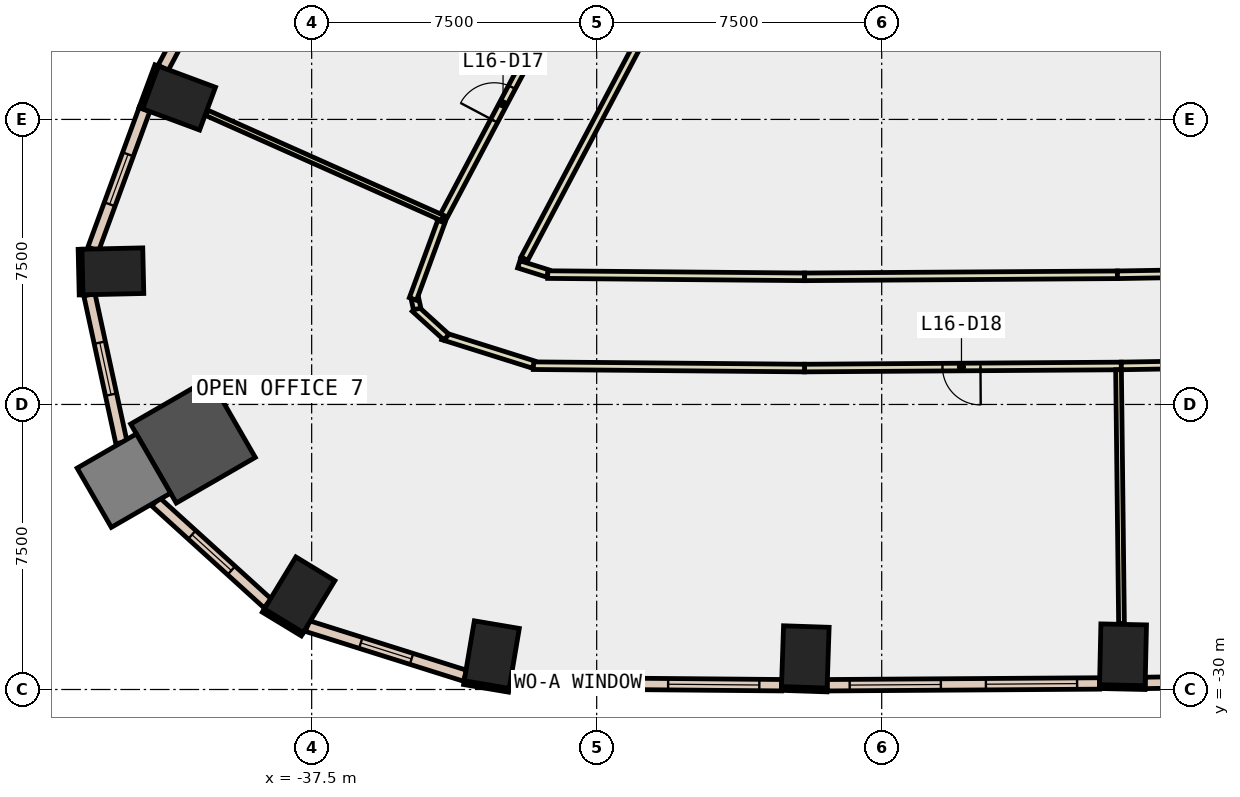
"""IFC4 building model, lengths in metres.
Left out: names, types, materials, properties, quantities, classifications, styles, units other than length and angle.
Written with IfcOpenShell. Run it as: python <this file> out.ifc"""

import sys

from ifc_helpers import new_model, si_unit, direction, frame, frame_2d, origin, origin_2d, place, context, subcontext, project, spatial, rectangle, extrude, element, fill, save


model = new_model("IFC4")
c1 = context("Model", 3, precision=1e-05, world=origin(), true_north=direction((0.0, 1.0)))
c2 = subcontext(c1, "Body", "Model", "MODEL_VIEW")
j1 = project(units=[si_unit("LENGTHUNIT", "METRE"), si_unit("PLANEANGLEUNIT", "RADIAN")], contexts=[c1])
p1 = place(None, origin())
s1 = spatial("IfcSite", under=j1, at=p1, CompositionType="ELEMENT")
p2 = place(p1, origin())
s2 = spatial("IfcBuilding", under=s1, at=p2, CompositionType="ELEMENT")
p3 = place(p2, frame((0.0, 0.0, 77.0)))
s3 = spatial("IfcBuildingStorey", under=s2, at=p3, CompositionType="ELEMENT", Elevation=77.0)
for number, where, z_axis, x_axis in (
    (1, (-32.761, -29.082, -0.4), (0.0, 0.0, 1.0), (-0.986, 0.167, 0.0)),
    (2, (-24.51, -29.143, -0.4), (0.0, 0.0, 1.0), (-0.999, 0.034, 0.0)),
    (3, (-16.15, -29.087, -0.4), (0.0, 0.0, 1.0), (-1.0, 0.022, 0.0)),
    (4, (-40.99, -14.438, -0.4), (0.0, 0.0, 1.0), (0.348, 0.937, 0.0)),
    (5, (-42.731, -18.998, -0.4), (0.0, 0.0, 1.0), (-0.023, 1.0, 0.0)),
):
    element("IfcColumn", number, at=place(p3, frame(where, z_axis=z_axis, x_axis=x_axis)), inside=s3, PredefinedType="COLUMN", context=c2, shape_type="SweptSolid", body=[
        extrude(rectangle(XDim=1.2, YDim=1.6, at=origin_2d()), origin(), (0.0, 0.0, 1.0), 4.0),
    ])
p4 = place(p3, frame((-40.623, -23.454, -0.4), z_axis=(0.0, 0.0, 1.0), x_axis=(0.866025403784, 0.5, 0.0)))
e6 = element("IfcColumn", 6, at=p4, inside=s3, PredefinedType="COLUMN", context=c2, shape_type="SweptSolid", body=[
    extrude(rectangle(XDim=2.4, YDim=2.4, at=origin_2d()), origin(), (0.0, 0.0, 1.0), 4.0),
])
p5 = place(p3, frame((-37.818, -27.508, -0.4), z_axis=(0.0, 0.0, 1.0), x_axis=(-0.854522294989, 0.519414716163, 0.0)))
e7 = element("IfcColumn", 7, at=p5, inside=s3, PredefinedType="COLUMN", context=c2, shape_type="SweptSolid", body=[
    extrude(rectangle(XDim=1.2, YDim=1.6, at=origin_2d()), origin(), (0.0, 0.0, 1.0), 4.0),
])
p6 = place(p3, frame((-42.442, -24.504, -0.4), z_axis=(0.0, 0.0, 1.0), x_axis=(0.866025403784, 0.5, 0.0)))
e8 = element("IfcColumn", 8, at=p6, inside=s3, PredefinedType="COLUMN", context=c2, shape_type="SweptSolid", body=[
    extrude(rectangle(XDim=1.8, YDim=1.8, at=origin_2d()), origin(), (0.0, 0.0, 1.0), 4.0),
])
p7 = place(p3, frame((-41.578, -13.58, 0.0), z_axis=(0.0, 0.0, 1.0), x_axis=(-0.348446984414, -0.937328490473, 0.0)))
e9 = element("IfcWall", 9, at=p7, inside=s3, PredefinedType="STANDARD", context=c2, shape_type="SweptSolid", body=[
    extrude(rectangle(XDim=1.2, YDim=0.1, at=frame_2d((0.6, 0.0))), origin(), (0.0, 0.0, 1.0), 3.6),
])
for number, where, z_axis, x_axis in (
    (10, (-33.494, -29.82, 0.0), (0.0, 0.0, 1.0), (0.986, -0.167, 0.0)),
    (11, (-25.138, -29.972, 0.0), (0.0, 0.0, 1.0), (0.999, -0.033, 0.0)),
):
    element("IfcWall", number, at=place(p3, frame(where, z_axis=z_axis, x_axis=x_axis)), inside=s3, PredefinedType="STANDARD", context=c2, shape_type="SweptSolid", body=[
        extrude(rectangle(XDim=1.2, YDim=0.1, at=frame_2d((0.6, 0.0))), origin(), (0.0, 0.0, 1.0), 3.6),
    ])
for number, where, z_axis, x_axis in (
    (12, (-16.769, -29.924, 0.0), (0.0, 0.0, 1.0), (1.0, -0.022, 0.0)),
    (13, (-43.595, -18.417, 0.0), (0.0, 0.0, 1.0), (0.023, -1.0, 0.0)),
    (14, (-38.772, -27.923, 0.0), (0.0, 0.0, 1.0), (0.855, -0.519, 0.0)),
):
    element("IfcWall", number, at=place(p3, frame(where, z_axis=z_axis, x_axis=x_axis)), inside=s3, PredefinedType="STANDARD", context=c2, shape_type="SweptSolid", body=[
        extrude(rectangle(XDim=1.2, YDim=0.1, at=frame_2d((0.6, 0.0))), origin(), (0.0, 0.0, 1.0), 3.6),
    ])
p8 = place(p3, frame((-32.279, -29.825, 0.0), z_axis=(0.0, 0.0, 1.0), x_axis=(0.999962339493, -0.008678686333, 0.0)))
e15 = element("IfcWall", 15, at=p8, inside=s3, PredefinedType="STANDARD", context=c2, shape_type="SweptSolid", body=[
    extrude(rectangle(XDim=7.145, YDim=0.3, at=frame_2d((3.573, 0.0))), origin(), (0.0, 0.0, 1.0), 3.6),
])
p9 = place(p8, frame((0.586, 0.0, 0.9)))
e16 = element("IfcOpeningElement", 16, at=p9, cuts=e15, PredefinedType="OPENING", context=c2, shape_type="SweptSolid", body=[
    extrude(rectangle(XDim=2.4, YDim=2.6, at=frame_2d((1.2, 1.3))), frame((0.0, 0.16, 0.0), z_axis=(0.0, -1.0, 0.0), x_axis=(1.0, 0.0, 0.0)), (0.0, 0.0, 1.0), 0.32),
])
p10 = place(p8, frame((4.159, 0.0, 0.9)))
e17 = element("IfcOpeningElement", 17, at=p10, cuts=e15, PredefinedType="OPENING", context=c2, shape_type="SweptSolid", body=[
    extrude(rectangle(XDim=2.4, YDim=2.6, at=frame_2d((1.2, 1.3))), frame((0.0, 0.16, 0.0), z_axis=(0.0, -1.0, 0.0), x_axis=(1.0, 0.0, 0.0)), (0.0, 0.0, 1.0), 0.32),
])
p11 = place(p3, frame((-23.935, -29.888, 0.0), z_axis=(0.0, 0.0, 1.0), x_axis=(0.999978623918, 0.006538478947, 0.0)))
e18 = element("IfcWall", 18, at=p11, inside=s3, PredefinedType="STANDARD", context=c2, shape_type="SweptSolid", body=[
    extrude(rectangle(XDim=7.169, YDim=0.3, at=frame_2d((3.584, 0.0))), origin(), (0.0, 0.0, 1.0), 3.6),
])
p12 = place(p11, frame((0.592, 0.0, 0.9)))
e19 = element("IfcOpeningElement", 19, at=p12, cuts=e18, PredefinedType="OPENING", context=c2, shape_type="SweptSolid", body=[
    extrude(rectangle(XDim=2.4, YDim=2.6, at=frame_2d((1.2, 1.3))), frame((0.0, 0.16, 0.0), z_axis=(0.0, -1.0, 0.0), x_axis=(1.0, 0.0, 0.0)), (0.0, 0.0, 1.0), 0.32),
])
p13 = place(p11, frame((4.177, 0.0, 0.9)))
e20 = element("IfcOpeningElement", 20, at=p13, cuts=e18, PredefinedType="OPENING", context=c2, shape_type="SweptSolid", body=[
    extrude(rectangle(XDim=2.4, YDim=2.6, at=frame_2d((1.2, 1.3))), frame((0.0, 0.16, 0.0), z_axis=(0.0, -1.0, 0.0), x_axis=(1.0, 0.0, 0.0)), (0.0, 0.0, 1.0), 0.32),
])
p14 = place(p3, frame((-15.567, -29.827, 0.0), z_axis=(0.0, 0.0, 1.0), x_axis=(0.999857944706, 0.0168549817, 0.0)))
e21 = element("IfcWall", 21, at=p14, inside=s3, PredefinedType="STANDARD", context=c2, shape_type="SweptSolid", body=[
    extrude(rectangle(XDim=7.17, YDim=0.3, at=frame_2d((3.585, 0.0))), origin(), (0.0, 0.0, 1.0), 3.6),
])
p15 = place(p14, frame((0.593, 0.0, 0.9)))
e22 = element("IfcOpeningElement", 22, at=p15, cuts=e21, PredefinedType="OPENING", context=c2, shape_type="SweptSolid", body=[
    extrude(rectangle(XDim=2.4, YDim=2.6, at=frame_2d((1.2, 1.3))), frame((0.0, 0.16, 0.0), z_axis=(0.0, -1.0, 0.0), x_axis=(1.0, 0.0, 0.0)), (0.0, 0.0, 1.0), 0.32),
])
p16 = place(p14, frame((4.178, 0.0, 0.9)))
e23 = element("IfcOpeningElement", 23, at=p16, cuts=e21, PredefinedType="OPENING", context=c2, shape_type="SweptSolid", body=[
    extrude(rectangle(XDim=2.4, YDim=2.6, at=frame_2d((1.2, 1.3))), frame((0.0, 0.16, 0.0), z_axis=(0.0, -1.0, 0.0), x_axis=(1.0, 0.0, 0.0)), (0.0, 0.0, 1.0), 0.32),
])
p17 = place(p3, frame((-38.469, -8.092, 0.0), z_axis=(0.0, 0.0, 1.0), x_axis=(-0.467968066899, -0.883745375299, 0.0)))
e24 = element("IfcWall", 24, at=p17, inside=s3, PredefinedType="STANDARD", context=c2, shape_type="SweptSolid", body=[
    extrude(rectangle(XDim=6.282, YDim=0.3, at=frame_2d((3.141, 0.0))), origin(), (0.0, 0.0, 1.0), 3.6),
])
p18 = place(p17, frame((0.571, 0.0, 0.9)))
e25 = element("IfcOpeningElement", 25, at=p18, cuts=e24, PredefinedType="OPENING", context=c2, shape_type="SweptSolid", body=[
    extrude(rectangle(XDim=2.0, YDim=2.6, at=frame_2d((1.0, 1.3))), frame((0.0, 0.16, 0.0), z_axis=(0.0, -1.0, 0.0), x_axis=(1.0, 0.0, 0.0)), (0.0, 0.0, 1.0), 0.32),
])
p19 = place(p17, frame((3.712, 0.0, 0.9)))
e26 = element("IfcOpeningElement", 26, at=p19, cuts=e24, PredefinedType="OPENING", context=c2, shape_type="SweptSolid", body=[
    extrude(rectangle(XDim=2.0, YDim=2.6, at=frame_2d((1.0, 1.3))), frame((0.0, 0.16, 0.0), z_axis=(0.0, -1.0, 0.0), x_axis=(1.0, 0.0, 0.0)), (0.0, 0.0, 1.0), 0.32),
])
p20 = place(p3, frame((-41.9, -14.74, 0.0), z_axis=(0.0, 0.0, 1.0), x_axis=(-0.344819708397, -0.938668934556, 0.0)))
e27 = element("IfcWall", 27, at=p20, inside=s3, PredefinedType="STANDARD", context=c2, shape_type="SweptSolid", body=[
    extrude(rectangle(XDim=3.91, YDim=0.3, at=frame_2d((1.955, 0.0))), origin(), (0.0, 0.0, 1.0), 3.6),
])
p21 = place(p20, frame((1.255, 0.0, 0.9)))
e28 = element("IfcOpeningElement", 28, at=p21, cuts=e27, PredefinedType="OPENING", context=c2, shape_type="SweptSolid", body=[
    extrude(rectangle(XDim=1.4, YDim=2.6, at=frame_2d((0.7, 1.3))), frame((0.0, 0.16, 0.0), z_axis=(0.0, -1.0, 0.0), x_axis=(1.0, 0.0, 0.0)), (0.0, 0.0, 1.0), 0.32),
])
p22 = place(p3, frame((-43.349, -19.611, 0.0), z_axis=(0.0, 0.0, 1.0), x_axis=(0.211701618364, -0.977334346466, 0.0)))
e29 = element("IfcWall", 29, at=p22, inside=s3, PredefinedType="STANDARD", context=c2, shape_type="SweptSolid", body=[
    extrude(rectangle(XDim=3.982, YDim=0.3, at=frame_2d((1.991, 0.0))), origin(), (0.0, 0.0, 1.0), 3.6),
])
p23 = place(p22, frame((1.291, 0.0, 0.9)))
e30 = element("IfcOpeningElement", 30, at=p23, cuts=e29, PredefinedType="OPENING", context=c2, shape_type="SweptSolid", body=[
    extrude(rectangle(XDim=1.4, YDim=2.6, at=frame_2d((0.7, 1.3))), frame((0.0, 0.16, 0.0), z_axis=(0.0, -1.0, 0.0), x_axis=(1.0, 0.0, 0.0)), (0.0, 0.0, 1.0), 0.32),
])
p24 = place(p3, frame((-41.606, -25.06, 0.0), z_axis=(0.0, 0.0, 1.0), x_axis=(0.740547309915, -0.6720042275, 0.0)))
e31 = element("IfcWall", 31, at=p24, inside=s3, PredefinedType="STANDARD", context=c2, shape_type="SweptSolid", body=[
    extrude(rectangle(XDim=3.982, YDim=0.3, at=frame_2d((1.991, 0.0))), origin(), (0.0, 0.0, 1.0), 3.6),
])
p25 = place(p24, frame((1.291, 0.0, 0.9)))
e32 = element("IfcOpeningElement", 32, at=p25, cuts=e31, PredefinedType="OPENING", context=c2, shape_type="SweptSolid", body=[
    extrude(rectangle(XDim=1.4, YDim=2.6, at=frame_2d((0.7, 1.3))), frame((0.0, 0.16, 0.0), z_axis=(0.0, -1.0, 0.0), x_axis=(1.0, 0.0, 0.0)), (0.0, 0.0, 1.0), 0.32),
])
p26 = place(p3, frame((-37.616, -28.33, 0.0), z_axis=(0.0, 0.0, 1.0), x_axis=(0.953822182375, -0.300371843571, 0.0)))
e33 = element("IfcWall", 33, at=p26, inside=s3, PredefinedType="STANDARD", context=c2, shape_type="SweptSolid", body=[
    extrude(rectangle(XDim=4.354, YDim=0.3, at=frame_2d((2.177, 0.0))), origin(), (0.0, 0.0, 1.0), 3.6),
])
p27 = place(p26, frame((1.477, 0.0, 0.9)))
e34 = element("IfcOpeningElement", 34, at=p27, cuts=e33, PredefinedType="OPENING", context=c2, shape_type="SweptSolid", body=[
    extrude(rectangle(XDim=1.4, YDim=2.6, at=frame_2d((0.7, 1.3))), frame((0.0, 0.16, 0.0), z_axis=(0.0, -1.0, 0.0), x_axis=(1.0, 0.0, 0.0)), (0.0, 0.0, 1.0), 0.32),
])
p28 = place(p3, frame((-28.712, -12.638, 0.0), z_axis=(0.0, 0.0, 1.0), x_axis=(-0.46804565502, -0.883704285843, 0.0)))
e35 = element("IfcWall", 35, at=p28, inside=s3, PredefinedType="PARTITIONING", context=c2, shape_type="SweptSolid", body=[
    extrude(rectangle(XDim=6.818, YDim=0.2, at=frame_2d((3.409, 0.0))), origin(), (0.0, 0.0, 1.0), 3.6),
])
p29 = place(p3, frame((-32.05, -18.813, 0.0), z_axis=(0.0, 0.0, 1.0), x_axis=(0.953816959026, -0.300388429661, 0.0)))
e36 = element("IfcWall", 36, at=p29, inside=s3, PredefinedType="PARTITIONING", context=c2, shape_type="SweptSolid", body=[
    extrude(rectangle(XDim=0.802, YDim=0.2, at=frame_2d((0.401, 0.0))), origin(), (0.0, 0.0, 1.0), 3.6),
])
p30 = place(p3, frame((-31.289, -19.083, 0.0), z_axis=(0.0, 0.0, 1.0), x_axis=(0.999961820006, -0.00873833678, 0.0)))
e37 = element("IfcWall", 37, at=p30, inside=s3, PredefinedType="PARTITIONING", context=c2, shape_type="SweptSolid", body=[
    extrude(rectangle(XDim=6.761, YDim=0.2, at=frame_2d((3.381, 0.0))), origin(), (0.0, 0.0, 1.0), 3.6),
])
p31 = place(p3, frame((-24.528, -19.142, 0.0), z_axis=(0.0, 0.0, 1.0), x_axis=(0.999978315754, 0.00658544011, 0.0)))
e38 = element("IfcWall", 38, at=p31, inside=s3, PredefinedType="PARTITIONING", context=c2, shape_type="SweptSolid", body=[
    extrude(rectangle(XDim=8.23, YDim=0.2, at=frame_2d((4.115, 0.0))), origin(), (0.0, 0.0, 1.0), 3.6),
])
p32 = place(p3, frame((-16.298, -19.088, 0.0), z_axis=(0.0, 0.0, 1.0), x_axis=(0.999857252997, 0.016895964865, 0.0)))
e39 = element("IfcWall", 39, at=p32, inside=s3, PredefinedType="PARTITIONING", context=c2, shape_type="SweptSolid", body=[
    extrude(rectangle(XDim=8.395, YDim=0.2, at=frame_2d((4.198, 0.0))), origin(), (0.0, 0.0, 1.0), 3.6),
])
p33 = place(p32, frame((3.298, 0.0, 0.0)))
e40 = element("IfcOpeningElement", 40, at=p33, cuts=e39, PredefinedType="OPENING", context=c2, shape_type="SweptSolid", body=[
    extrude(rectangle(XDim=1.8, YDim=2.1, at=frame_2d((0.9, 1.05))), frame((0.0, 0.11, 0.0), z_axis=(0.0, -1.0, 0.0), x_axis=(1.0, 0.0, 0.0)), (0.0, 0.0, 1.0), 0.22),
])
p34 = place(p3, frame((-34.1, -17.683, 0.0), z_axis=(0.0, 0.0, 1.0), x_axis=(0.468043346631, 0.883705508456, 0.0)))
e41 = element("IfcWall", 41, at=p34, inside=s3, PredefinedType="PARTITIONING", context=c2, shape_type="SweptSolid", body=[
    extrude(rectangle(XDim=6.991, YDim=0.2, at=frame_2d((3.496, 0.0))), origin(), (0.0, 0.0, 1.0), 3.6),
])
p35 = place(p34, frame((2.996, 0.0, 0.0)))
e42 = element("IfcOpeningElement", 42, at=p35, cuts=e41, PredefinedType="OPENING", context=c2, shape_type="SweptSolid", body=[
    extrude(rectangle(XDim=1.0, YDim=2.1, at=frame_2d((0.5, 1.05))), frame((0.0, 0.11, 0.0), z_axis=(0.0, -1.0, 0.0), x_axis=(1.0, 0.0, 0.0)), (0.0, 0.0, 1.0), 0.22),
])
p36 = place(p3, frame((-16.195, -21.487, 0.0), z_axis=(0.0, 0.0, 1.0), x_axis=(-0.999978288386, -0.006589594508, 0.0)))
e43 = element("IfcWall", 43, at=p36, inside=s3, PredefinedType="PARTITIONING", context=c2, shape_type="SweptSolid", body=[
    extrude(rectangle(XDim=8.336, YDim=0.2, at=frame_2d((4.168, 0.0))), origin(), (0.0, 0.0, 1.0), 3.6),
])
p37 = place(p36, frame((3.706, 0.0, 0.0)))
e44 = element("IfcOpeningElement", 44, at=p37, cuts=e43, PredefinedType="OPENING", context=c2, shape_type="SweptSolid", body=[
    extrude(rectangle(XDim=1.0, YDim=2.1, at=frame_2d((0.5, 1.05))), frame((0.0, 0.11, 0.0), z_axis=(0.0, -1.0, 0.0), x_axis=(1.0, 0.0, 0.0)), (0.0, 0.0, 1.0), 0.22),
])
p38 = place(p3, frame((-24.531, -21.542, 0.0), z_axis=(0.0, 0.0, 1.0), x_axis=(-0.999962254422, 0.008688482627, 0.0)))
e45 = element("IfcWall", 45, at=p38, inside=s3, PredefinedType="PARTITIONING", context=c2, shape_type="SweptSolid", body=[
    extrude(rectangle(XDim=7.137, YDim=0.2, at=frame_2d((3.569, 0.0))), origin(), (0.0, 0.0, 1.0), 3.6),
])
p39 = place(p3, frame((-31.664, -21.45, 0.0), z_axis=(0.0, 0.0, 1.0), x_axis=(-0.953945024313, 0.299981483743, 0.0)))
e46 = element("IfcWall", 46, at=p39, inside=s3, PredefinedType="PARTITIONING", context=c2, shape_type="SweptSolid", body=[
    extrude(rectangle(XDim=2.5, YDim=0.2, at=frame_2d((1.25, 0.0))), origin(), (0.0, 0.0, 1.0), 3.6),
])
p40 = place(p3, frame((-33.954, -20.729, 0.0), z_axis=(0.0, 0.0, 1.0), x_axis=(-0.740510227228, 0.672045090281, 0.0)))
e47 = element("IfcWall", 47, at=p40, inside=s3, PredefinedType="PARTITIONING", context=c2, shape_type="SweptSolid", body=[
    extrude(rectangle(XDim=1.123, YDim=0.2, at=frame_2d((0.562, 0.0))), origin(), (0.0, 0.0, 1.0), 3.6),
])
p41 = place(p3, frame((-34.724, -19.987, 0.0), z_axis=(0.0, 0.0, 1.0), x_axis=(-0.210230703369, 0.977651804765, 0.0)))
e48 = element("IfcWall", 48, at=p41, inside=s3, PredefinedType="PARTITIONING", context=c2, shape_type="SweptSolid", body=[
    extrude(rectangle(XDim=0.309, YDim=0.2, at=frame_2d((0.154, 0.0))), origin(), (0.0, 0.0, 1.0), 3.6),
])
p42 = place(p3, frame((-34.835, -19.724, 0.0), z_axis=(0.0, 0.0, 1.0), x_axis=(0.34459875492, 0.938750072228, 0.0)))
e49 = element("IfcWall", 49, at=p42, inside=s3, PredefinedType="PARTITIONING", context=c2, shape_type="SweptSolid", body=[
    extrude(rectangle(XDim=2.168, YDim=0.2, at=frame_2d((1.084, 0.0))), origin(), (0.0, 0.0, 1.0), 3.6),
])
p43 = place(p3, frame((-7.881, -21.346, 0.0), z_axis=(0.0, 0.0, 1.0), x_axis=(-0.999857974935, -0.016853188395, 0.0)))
e50 = element("IfcWall", 50, at=p43, inside=s3, PredefinedType="PARTITIONING", context=c2, shape_type="SweptSolid", body=[
    extrude(rectangle(XDim=8.315, YDim=0.2, at=frame_2d((4.158, 0.0))), origin(), (0.0, 0.0, 1.0), 3.6),
])
p44 = place(p43, frame((3.732, 0.0, 0.0)))
e51 = element("IfcOpeningElement", 51, at=p44, cuts=e50, PredefinedType="OPENING", context=c2, shape_type="SweptSolid", body=[
    extrude(rectangle(XDim=1.0, YDim=2.1, at=frame_2d((0.5, 1.05))), frame((0.0, 0.11, 0.0), z_axis=(0.0, -1.0, 0.0), x_axis=(1.0, 0.0, 0.0)), (0.0, 0.0, 1.0), 0.22),
])
p45 = place(p3, frame((-34.053, -17.595, 0.0), z_axis=(0.0, 0.0, 1.0), x_axis=(-0.913298274621, 0.40729137184, 0.0)))
e52 = element("IfcWall", 52, at=p45, inside=s3, PredefinedType="PARTITIONING", context=c2, shape_type="SweptSolid", body=[
    extrude(rectangle(XDim=6.796, YDim=0.15, at=frame_2d((3.398, 0.0))), origin(), (0.0, 0.0, 1.0), 3.6),
])
p46 = place(p3, frame((-16.268, -21.587, 0.0), z_axis=(0.0, 0.0, 1.0), x_axis=(0.0116959614, -0.999931599904, 0.0)))
e53 = element("IfcWall", 53, at=p46, inside=s3, PredefinedType="PARTITIONING", context=c2, shape_type="SweptSolid", body=[
    extrude(rectangle(XDim=6.68, YDim=0.15, at=frame_2d((3.34, 0.0))), origin(), (0.0, 0.0, 1.0), 3.6),
])
p47 = place(p9, origin())
e54 = element("IfcWindow", 54, at=p47, inside=s3, PartitioningType="SINGLE_PANEL", PredefinedType="WINDOW", context=c2, shape_type="SweptSolid", body=[
    extrude(rectangle(XDim=2.4, YDim=2.6, at=frame_2d((1.2, 1.3))), frame((0.0, 0.03, 0.0), z_axis=(0.0, -1.0, 0.0), x_axis=(1.0, 0.0, 0.0)), (0.0, 0.0, 1.0), 0.06),
])
fill(e16, e54)
p48 = place(p10, origin())
e55 = element("IfcWindow", 55, at=p48, inside=s3, PartitioningType="SINGLE_PANEL", PredefinedType="WINDOW", context=c2, shape_type="SweptSolid", body=[
    extrude(rectangle(XDim=2.4, YDim=2.6, at=frame_2d((1.2, 1.3))), frame((0.0, 0.03, 0.0), z_axis=(0.0, -1.0, 0.0), x_axis=(1.0, 0.0, 0.0)), (0.0, 0.0, 1.0), 0.06),
])
fill(e17, e55)
p49 = place(p12, origin())
e56 = element("IfcWindow", 56, at=p49, inside=s3, PartitioningType="SINGLE_PANEL", PredefinedType="WINDOW", context=c2, shape_type="SweptSolid", body=[
    extrude(rectangle(XDim=2.4, YDim=2.6, at=frame_2d((1.2, 1.3))), frame((0.0, 0.03, 0.0), z_axis=(0.0, -1.0, 0.0), x_axis=(1.0, 0.0, 0.0)), (0.0, 0.0, 1.0), 0.06),
])
fill(e19, e56)
p50 = place(p13, origin())
e57 = element("IfcWindow", 57, at=p50, inside=s3, PartitioningType="SINGLE_PANEL", PredefinedType="WINDOW", context=c2, shape_type="SweptSolid", body=[
    extrude(rectangle(XDim=2.4, YDim=2.6, at=frame_2d((1.2, 1.3))), frame((0.0, 0.03, 0.0), z_axis=(0.0, -1.0, 0.0), x_axis=(1.0, 0.0, 0.0)), (0.0, 0.0, 1.0), 0.06),
])
fill(e20, e57)
p51 = place(p21, origin())
e58 = element("IfcWindow", 58, at=p51, inside=s3, PartitioningType="SINGLE_PANEL", PredefinedType="WINDOW", context=c2, shape_type="SweptSolid", body=[
    extrude(rectangle(XDim=1.4, YDim=2.6, at=frame_2d((0.7, 1.3))), frame((0.0, 0.03, 0.0), z_axis=(0.0, -1.0, 0.0), x_axis=(1.0, 0.0, 0.0)), (0.0, 0.0, 1.0), 0.06),
])
fill(e28, e58)
p52 = place(p23, origin())
e59 = element("IfcWindow", 59, at=p52, inside=s3, PartitioningType="SINGLE_PANEL", PredefinedType="WINDOW", context=c2, shape_type="SweptSolid", body=[
    extrude(rectangle(XDim=1.4, YDim=2.6, at=frame_2d((0.7, 1.3))), frame((0.0, 0.03, 0.0), z_axis=(0.0, -1.0, 0.0), x_axis=(1.0, 0.0, 0.0)), (0.0, 0.0, 1.0), 0.06),
])
fill(e30, e59)
p53 = place(p25, origin())
e60 = element("IfcWindow", 60, at=p53, inside=s3, PartitioningType="SINGLE_PANEL", PredefinedType="WINDOW", context=c2, shape_type="SweptSolid", body=[
    extrude(rectangle(XDim=1.4, YDim=2.6, at=frame_2d((0.7, 1.3))), frame((0.0, 0.03, 0.0), z_axis=(0.0, -1.0, 0.0), x_axis=(1.0, 0.0, 0.0)), (0.0, 0.0, 1.0), 0.06),
])
fill(e32, e60)
p54 = place(p27, origin())
e61 = element("IfcWindow", 61, at=p54, inside=s3, PartitioningType="SINGLE_PANEL", PredefinedType="WINDOW", context=c2, shape_type="SweptSolid", body=[
    extrude(rectangle(XDim=1.4, YDim=2.6, at=frame_2d((0.7, 1.3))), frame((0.0, 0.03, 0.0), z_axis=(0.0, -1.0, 0.0), x_axis=(1.0, 0.0, 0.0)), (0.0, 0.0, 1.0), 0.06),
])
fill(e34, e61)
p55 = place(p35, origin())
e62 = element("IfcDoor", 62, at=p55, inside=s3, OperationType="SINGLE_SWING_LEFT", PredefinedType="DOOR", context=c2, shape_type="SweptSolid", body=[
    extrude(rectangle(XDim=1.0, YDim=2.1, at=frame_2d((0.5, 1.05))), frame((0.0, 0.025, 0.0), z_axis=(0.0, -1.0, 0.0), x_axis=(1.0, 0.0, 0.0)), (0.0, 0.0, 1.0), 0.05),
])
fill(e42, e62)
p56 = place(p37, origin())
e63 = element("IfcDoor", 63, at=p56, inside=s3, OperationType="SINGLE_SWING_RIGHT", PredefinedType="DOOR", context=c2, shape_type="SweptSolid", body=[
    extrude(rectangle(XDim=1.0, YDim=2.1, at=frame_2d((0.5, 1.05))), frame((0.0, 0.025, 0.0), z_axis=(0.0, -1.0, 0.0), x_axis=(1.0, 0.0, 0.0)), (0.0, 0.0, 1.0), 0.05),
])
fill(e44, e63)
save(model, sys.argv[1])
